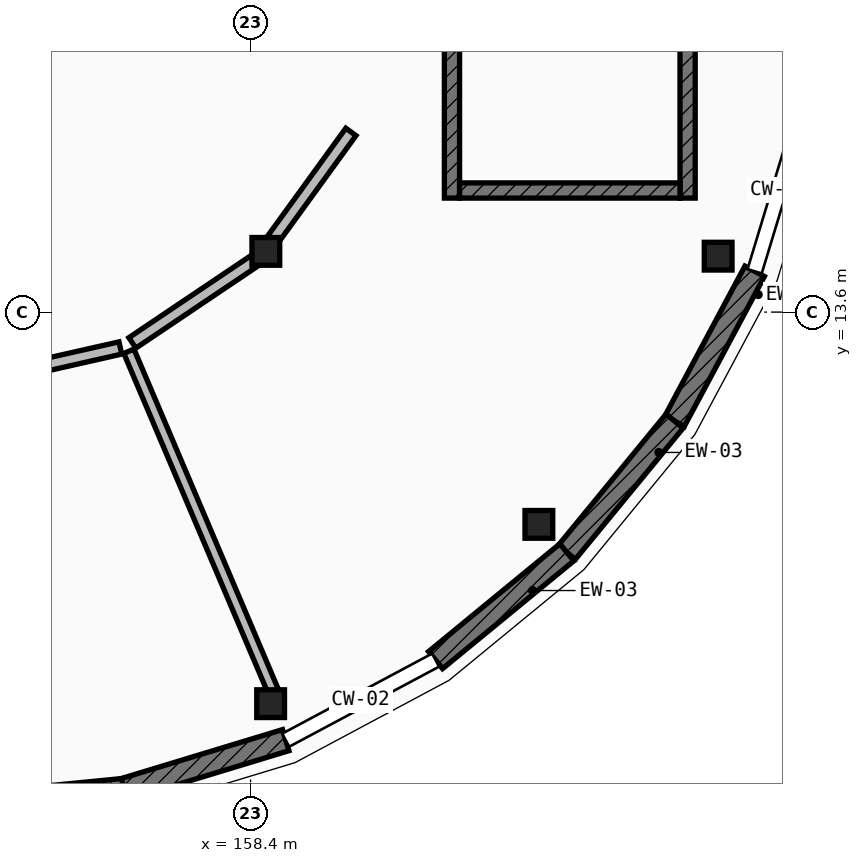
"""IFC4 building model, lengths in metres.
Left out: names, types, materials, properties, quantities, classifications, styles, units other than length and angle.
Written with IfcOpenShell. Run it as: python <this file> out.ifc"""

import sys

from ifc_helpers import new_model, si_unit, direction, frame, frame_2d, origin, origin_2d, place, context, subcontext, project, spatial, rectangle, extrude, element, fill, save


model = new_model("IFC4")
c1 = context("Model", 3, precision=1e-05, world=origin(), true_north=direction((0.0, 1.0)))
c2 = subcontext(c1, "Body", "Model", "MODEL_VIEW")
j1 = project(units=[si_unit("LENGTHUNIT", "METRE"), si_unit("PLANEANGLEUNIT", "RADIAN")], contexts=[c1])
p1 = place(None, origin())
s1 = spatial("IfcSite", under=j1, at=p1, CompositionType="ELEMENT")
p2 = place(p1, origin())
s2 = spatial("IfcBuilding", under=s1, at=p2, CompositionType="ELEMENT")
p3 = place(p2, frame((0.0, 0.0, 8.75)))
s3 = spatial("IfcBuildingStorey", under=s2, at=p3, CompositionType="ELEMENT", Elevation=8.75)
for number, where, z_axis, x_axis in (
    (1, (158.664, 8.448, 0.0), (0.0, 0.0, 1.0), (1.0, 0.0, 0.0)),
    (2, (162.193, 10.807, 0.0), (0.0, 0.0, 1.0), (1.0, 0.0, 0.0)),
    (3, (164.552, 14.336, 0.0), (0.0, 0.0, 1.0), (1.0, 0.0, 0.0)),
    (4, (158.601, 14.399, 0.0), (0.0, 0.0, 1.0), (1.0, 0.0, 0.0)),
):
    element("IfcColumn", number, at=place(p3, frame(where, z_axis=z_axis, x_axis=x_axis)), inside=s3, PredefinedType="COLUMN", context=c2, shape_type="SweptSolid", body=[
        extrude(rectangle(XDim=0.365, YDim=0.365, at=origin_2d()), origin(), (0.0, 0.0, 1.0), 4.2),
    ])
p4 = place(p3, frame((165.032, 14.137, 0.0), z_axis=(0.0, 0.0, 1.0), x_axis=(-0.471217561446, -0.882017012185, 0.0)))
e5 = element("IfcWall", 5, at=p4, inside=s3, PredefinedType="ELEMENTEDWALL", context=c2, shape_type="SweptSolid", body=[
    extrude(rectangle(XDim=2.235, YDim=0.29, at=frame_2d((1.117, 0.0))), origin(), (0.0, 0.0, 1.0), 3.314),
])
p5 = place(p4, frame((0.627, 0.0, 0.85)))
e6 = element("IfcOpeningElement", 6, at=p5, cuts=e5, PredefinedType="OPENING", context=c2, shape_type="SweptSolid", body=[
    extrude(rectangle(XDim=0.98, YDim=1.5, at=frame_2d((0.49, 0.75))), frame((0.0, 0.155, 0.0), z_axis=(0.0, -1.0, 0.0), x_axis=(1.0, 0.0, 0.0)), (0.0, 0.0, 1.0), 0.31),
])
p6 = place(p3, frame((163.979, 12.166, 0.0), z_axis=(0.0, 0.0, 1.0), x_axis=(-0.63455767339, -0.772875513354, 0.0)))
e7 = element("IfcWall", 7, at=p6, inside=s3, PredefinedType="ELEMENTEDWALL", context=c2, shape_type="SweptSolid", body=[
    extrude(rectangle(XDim=2.235, YDim=0.29, at=frame_2d((1.117, 0.0))), origin(), (0.0, 0.0, 1.0), 3.314),
])
p7 = place(p6, frame((0.627, 0.0, 0.85)))
e8 = element("IfcOpeningElement", 8, at=p7, cuts=e7, PredefinedType="OPENING", context=c2, shape_type="SweptSolid", body=[
    extrude(rectangle(XDim=0.98, YDim=1.75, at=frame_2d((0.49, 0.875))), frame((0.0, 0.155, 0.0), z_axis=(0.0, -1.0, 0.0), x_axis=(1.0, 0.0, 0.0)), (0.0, 0.0, 1.0), 0.31),
])
p8 = place(p3, frame((162.561, 10.439, 0.0), z_axis=(0.0, 0.0, 1.0), x_axis=(-0.772875513354, -0.63455767339, 0.0)))
e9 = element("IfcWall", 9, at=p8, inside=s3, PredefinedType="ELEMENTEDWALL", context=c2, shape_type="SweptSolid", body=[
    extrude(rectangle(XDim=2.235, YDim=0.29, at=frame_2d((1.117, 0.0))), origin(), (0.0, 0.0, 1.0), 3.314),
])
p9 = place(p8, frame((0.617, 0.0, 0.85)))
e10 = element("IfcOpeningElement", 10, at=p9, cuts=e9, PredefinedType="OPENING", context=c2, shape_type="SweptSolid", body=[
    extrude(rectangle(XDim=1.0, YDim=1.45, at=frame_2d((0.5, 0.725))), frame((0.0, 0.155, 0.0), z_axis=(0.0, -1.0, 0.0), x_axis=(1.0, 0.0, 0.0)), (0.0, 0.0, 1.0), 0.31),
])
p10 = place(p3, frame((158.863, 7.968, 0.0), z_axis=(0.0, 0.0, 1.0), x_axis=(-0.956928814218, -0.290322655883, 0.0)))
e11 = element("IfcWall", 11, at=p10, inside=s3, PredefinedType="ELEMENTEDWALL", context=c2, shape_type="SweptSolid", body=[
    extrude(rectangle(XDim=2.235, YDim=0.29, at=frame_2d((1.118, 0.0))), origin(), (0.0, 0.0, 1.0), 3.314),
])
p11 = place(p10, frame((0.618, 0.0, 0.85)))
e12 = element("IfcOpeningElement", 12, at=p11, cuts=e11, PredefinedType="OPENING", context=c2, shape_type="SweptSolid", body=[
    extrude(rectangle(XDim=1.0, YDim=1.75, at=frame_2d((0.5, 0.875))), frame((0.0, 0.155, 0.0), z_axis=(0.0, -1.0, 0.0), x_axis=(1.0, 0.0, 0.0)), (0.0, 0.0, 1.0), 0.31),
])
p12 = place(p3, frame((156.724, 7.319, 0.0), z_axis=(0.0, 0.0, 1.0), x_axis=(-0.995187461503, -0.097989369151, 0.0)))
e13 = element("IfcWall", 13, at=p12, inside=s3, PredefinedType="ELEMENTEDWALL", context=c2, shape_type="SweptSolid", body=[
    extrude(rectangle(XDim=2.235, YDim=0.29, at=frame_2d((1.117, 0.0))), origin(), (0.0, 0.0, 1.0), 3.314),
])
p13 = place(p12, frame((0.617, 0.0, 0.85)))
e14 = element("IfcOpeningElement", 14, at=p13, cuts=e13, PredefinedType="OPENING", context=c2, shape_type="SweptSolid", body=[
    extrude(rectangle(XDim=1.0, YDim=2.0, at=frame_2d((0.5, 1.0))), frame((0.0, 0.155, 0.0), z_axis=(0.0, -1.0, 0.0), x_axis=(1.0, 0.0, 0.0)), (0.0, 0.0, 1.0), 0.31),
])
p14 = place(p3, frame((161.05, 21.9, 0.0), z_axis=(0.0, 0.0, 1.0), x_axis=(0.0, -1.0, 0.0)))
e15 = element("IfcWall", 15, at=p14, inside=s3, PredefinedType="SHEAR", context=c2, shape_type="SweptSolid", body=[
    extrude(rectangle(XDim=6.8, YDim=0.2, at=frame_2d((3.4, 0.0))), origin(), (0.0, 0.0, 1.0), 3.96),
])
p15 = place(p14, frame((0.38, 0.0, 0.0)))
e16 = element("IfcOpeningElement", 16, at=p15, cuts=e15, PredefinedType="OPENING", context=c2, shape_type="SweptSolid", body=[
    extrude(rectangle(XDim=1.1, YDim=2.15, at=frame_2d((0.55, 1.075))), frame((0.0, 0.11, 0.0), z_axis=(0.0, -1.0, 0.0), x_axis=(1.0, 0.0, 0.0)), (0.0, 0.0, 1.0), 0.22),
])
p16 = place(p3, frame((164.15, 21.9, 0.0), z_axis=(0.0, 0.0, 1.0), x_axis=(0.0, -1.0, 0.0)))
e17 = element("IfcWall", 17, at=p16, inside=s3, PredefinedType="SHEAR", context=c2, shape_type="SweptSolid", body=[
    extrude(rectangle(XDim=6.8, YDim=0.2, at=frame_2d((3.4, 0.0))), origin(), (0.0, 0.0, 1.0), 3.96),
])
p17 = place(p3, frame((161.15, 15.2, 0.0), z_axis=(0.0, 0.0, 1.0), x_axis=(1.0, 0.0, 0.0)))
e18 = element("IfcWall", 18, at=p17, inside=s3, PredefinedType="SHEAR", context=c2, shape_type="SweptSolid", body=[
    extrude(rectangle(XDim=2.9, YDim=0.2, at=frame_2d((1.45, 0.0))), origin(), (0.0, 0.0, 1.0), 3.96),
])
p18 = place(p3, frame((156.799, 13.085, 0.0), z_axis=(0.0, 0.0, 1.0), x_axis=(0.390680175244, -0.920526480157, 0.0)))
e19 = element("IfcWall", 19, at=p18, inside=s3, PredefinedType="PARTITIONING", context=c2, shape_type="SweptSolid", body=[
    extrude(rectangle(XDim=4.907, YDim=0.145, at=frame_2d((2.453, 0.0))), origin(), (0.0, 0.0, 1.0), 3.279),
])
p19 = place(p3, frame((154.842, 12.71, 0.0), z_axis=(0.0, 0.0, 1.0), x_axis=(0.975286020369, 0.220946098567, 0.0)))
e20 = element("IfcWall", 20, at=p19, inside=s3, PredefinedType="PARTITIONING", context=c2, shape_type="SweptSolid", body=[
    extrude(rectangle(XDim=1.892, YDim=0.165, at=frame_2d((0.946, 0.0))), origin(), (0.0, 0.0, 1.0), 3.279),
])
p20 = place(p3, frame((156.845, 13.195, 0.0), z_axis=(0.0, 0.0, 1.0), x_axis=(0.829839559262, 0.558002066201, 0.0)))
e21 = element("IfcWall", 21, at=p20, inside=s3, PredefinedType="PARTITIONING", context=c2, shape_type="SweptSolid", body=[
    extrude(rectangle(XDim=1.943, YDim=0.165, at=frame_2d((0.971, 0.0))), origin(), (0.0, 0.0, 1.0), 3.279),
])
p21 = place(p20, frame((0.511, 0.0, 0.0)))
e22 = element("IfcOpeningElement", 22, at=p21, cuts=e21, PredefinedType="OPENING", context=c2, shape_type="SweptSolid", body=[
    extrude(rectangle(XDim=0.92, YDim=2.12, at=frame_2d((0.46, 1.06))), frame((0.0, 0.093, 0.0), z_axis=(0.0, -1.0, 0.0), x_axis=(1.0, 0.0, 0.0)), (0.0, 0.0, 1.0), 0.185),
])
p22 = place(p3, frame((158.697, 14.56, 0.0), z_axis=(0.0, 0.0, 1.0), x_axis=(0.586988232211, 0.809595463949, 0.0)))
e23 = element("IfcWall", 23, at=p22, inside=s3, PredefinedType="PARTITIONING", context=c2, shape_type="SweptSolid", body=[
    extrude(rectangle(XDim=1.743, YDim=0.165, at=frame_2d((0.871, 0.0))), origin(), (0.0, 0.0, 1.0), 3.279),
])
p23 = place(p5, origin())
e24 = element("IfcWindow", 24, at=p23, inside=s3, PartitioningType="SINGLE_PANEL", PredefinedType="WINDOW", context=c2, shape_type="SweptSolid", body=[
    extrude(rectangle(XDim=0.98, YDim=1.5, at=frame_2d((0.49, 0.75))), frame((0.0, 0.03, 0.0), z_axis=(0.0, -1.0, 0.0), x_axis=(1.0, 0.0, 0.0)), (0.0, 0.0, 1.0), 0.06),
])
fill(e6, e24)
p24 = place(p7, origin())
e25 = element("IfcWindow", 25, at=p24, inside=s3, PartitioningType="SINGLE_PANEL", PredefinedType="WINDOW", context=c2, shape_type="SweptSolid", body=[
    extrude(rectangle(XDim=0.98, YDim=1.75, at=frame_2d((0.49, 0.875))), frame((0.0, 0.03, 0.0), z_axis=(0.0, -1.0, 0.0), x_axis=(1.0, 0.0, 0.0)), (0.0, 0.0, 1.0), 0.06),
])
fill(e8, e25)
p25 = place(p9, origin())
e26 = element("IfcWindow", 26, at=p25, inside=s3, PartitioningType="SINGLE_PANEL", PredefinedType="WINDOW", context=c2, shape_type="SweptSolid", body=[
    extrude(rectangle(XDim=1.0, YDim=1.45, at=frame_2d((0.5, 0.725))), frame((0.0, 0.03, 0.0), z_axis=(0.0, -1.0, 0.0), x_axis=(1.0, 0.0, 0.0)), (0.0, 0.0, 1.0), 0.06),
])
fill(e10, e26)
p26 = place(p11, origin())
e27 = element("IfcWindow", 27, at=p26, inside=s3, PartitioningType="SINGLE_PANEL", PredefinedType="WINDOW", context=c2, shape_type="SweptSolid", body=[
    extrude(rectangle(XDim=1.0, YDim=1.75, at=frame_2d((0.5, 0.875))), frame((0.0, 0.03, 0.0), z_axis=(0.0, -1.0, 0.0), x_axis=(1.0, 0.0, 0.0)), (0.0, 0.0, 1.0), 0.06),
])
fill(e12, e27)
p27 = place(p21, origin())
e28 = element("IfcDoor", 28, at=p27, inside=s3, OperationType="SINGLE_SWING_RIGHT", PredefinedType="DOOR", context=c2, shape_type="SweptSolid", body=[
    extrude(rectangle(XDim=0.92, YDim=2.12, at=frame_2d((0.46, 1.06))), frame((0.0, 0.025, 0.0), z_axis=(0.0, -1.0, 0.0), x_axis=(1.0, 0.0, 0.0)), (0.0, 0.0, 1.0), 0.05),
])
fill(e22, e28)
save(model, sys.argv[1])
